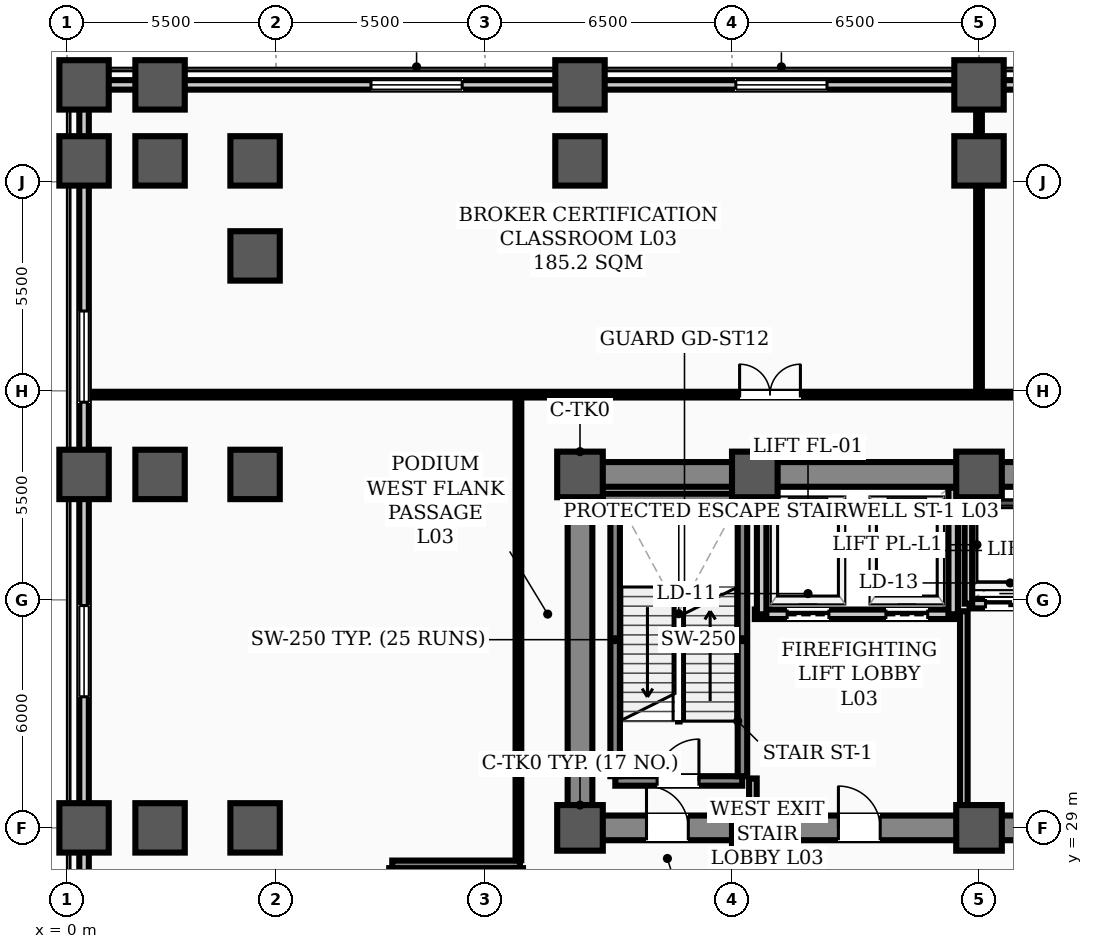
"""IFC4 building model, lengths in metres.
Left out: names, types, materials, properties, quantities, classifications, styles, units other than length and angle.
Written with IfcOpenShell. Run it as: python <this file> out.ifc"""

import sys

from ifc_helpers import new_model, si_unit, direction, frame, frame_2d, origin, origin_2d, place, context, subcontext, project, spatial, rectangle, hollow_rectangle, extrude, element, fill, save


model = new_model("IFC4")
c1 = context("Model", 3, precision=1e-05, world=origin(), true_north=direction((0.0, 1.0)))
c2 = subcontext(c1, "Body", "Model", "MODEL_VIEW")
j1 = project(units=[si_unit("LENGTHUNIT", "METRE"), si_unit("PLANEANGLEUNIT", "RADIAN")], contexts=[c1])
p1 = place(None, origin())
s1 = spatial("IfcSite", under=j1, at=p1, CompositionType="ELEMENT")
p2 = place(p1, origin())
s2 = spatial("IfcBuilding", under=s1, at=p2, CompositionType="ELEMENT")
p3 = place(p2, frame((0.0, 0.0, 11.2)))
s3 = spatial("IfcBuildingStorey", under=s2, at=p3, CompositionType="ELEMENT", Elevation=11.2)
for number, where, z_axis, x_axis in (
    (1, (13.5, 29.0, 0.0), (0.0, 0.0, 1.0), (1.0, 0.0, 0.0)),
    (2, (13.5, 38.3, 0.0), (0.0, 0.0, 1.0), (1.0, 0.0, 0.0)),
    (3, (18.1, 29.0, 0.0), (0.0, 0.0, 1.0), (1.0, 0.0, 0.0)),
    (4, (18.1, 38.3, 0.0), (0.0, 0.0, 1.0), (1.0, 0.0, 0.0)),
    (5, (24.0, 29.0, 0.0), (0.0, 0.0, 1.0), (1.0, 0.0, 0.0)),
    (6, (24.0, 38.3, 0.0), (0.0, 0.0, 1.0), (1.0, 0.0, 0.0)),
):
    element("IfcColumn", number, at=place(p3, frame(where, z_axis=z_axis, x_axis=x_axis)), inside=s3, PredefinedType="COLUMN", context=c2, shape_type="SweptSolid", body=[
        extrude(hollow_rectangle(XDim=1.2, YDim=1.2, WallThickness=0.04, InnerFilletRadius=0.02, OuterFilletRadius=0.06, at=origin_2d()), origin(), (0.0, 0.0, 1.0), 5.4),
    ])
for number, where, z_axis, x_axis in (
    (7, (0.45, 29.0, 0.0), (0.0, 0.0, 1.0), (1.0, 0.0, 0.0)),
    (8, (0.45, 38.3, 0.0), (0.0, 0.0, 1.0), (1.0, 0.0, 0.0)),
    (9, (0.45, 46.55, 0.0), (0.0, 0.0, 1.0), (1.0, 0.0, 0.0)),
    (10, (0.45, 48.55, 0.0), (0.0, 0.0, 1.0), (1.0, 0.0, 0.0)),
    (11, (2.45, 29.0, 0.0), (0.0, 0.0, 1.0), (1.0, 0.0, 0.0)),
    (12, (2.45, 38.3, 0.0), (0.0, 0.0, 1.0), (1.0, 0.0, 0.0)),
    (13, (2.45, 46.55, 0.0), (0.0, 0.0, 1.0), (1.0, 0.0, 0.0)),
    (14, (2.45, 48.55, 0.0), (0.0, 0.0, 1.0), (1.0, 0.0, 0.0)),
    (15, (4.95, 29.0, 0.0), (0.0, 0.0, 1.0), (1.0, 0.0, 0.0)),
    (16, (4.95, 38.3, 0.0), (0.0, 0.0, 1.0), (1.0, 0.0, 0.0)),
    (17, (4.95, 44.05, 0.0), (0.0, 0.0, 1.0), (1.0, 0.0, 0.0)),
    (18, (4.95, 46.55, 0.0), (0.0, 0.0, 1.0), (1.0, 0.0, 0.0)),
    (19, (13.5, 46.55, 0.0), (0.0, 0.0, 1.0), (1.0, 0.0, 0.0)),
    (20, (13.5, 48.55, 0.0), (0.0, 0.0, 1.0), (1.0, 0.0, 0.0)),
    (21, (24.0, 46.55, 0.0), (0.0, 0.0, 1.0), (1.0, 0.0, 0.0)),
    (22, (24.0, 48.55, 0.0), (0.0, 0.0, 1.0), (1.0, 0.0, 0.0)),
):
    element("IfcColumn", number, at=place(p3, frame(where, z_axis=z_axis, x_axis=x_axis)), inside=s3, PredefinedType="COLUMN", context=c2, shape_type="SweptSolid", body=[
        extrude(rectangle(XDim=1.3, YDim=1.3, at=origin_2d()), origin(), (0.0, 0.0, 1.0), 5.4),
    ])
p4 = place(p3, frame((0.45, 48.55, 0.0), z_axis=(0.0, 0.0, 1.0), x_axis=(1.0, 0.0, 0.0)))
e23 = element("IfcWall", 23, at=p4, inside=s3, PredefinedType="STANDARD", context=c2, shape_type="SweptSolid", body=[
    extrude(rectangle(XDim=54.1, YDim=0.25, at=frame_2d((27.05, 0.0))), origin(), (0.0, 0.0, 1.0), 4.37),
])
p5 = place(p4, frame((7.55, 0.0, 0.9)))
e24 = element("IfcOpeningElement", 24, at=p5, cuts=e23, PredefinedType="OPENING", context=c2, shape_type="SweptSolid", body=[
    extrude(rectangle(XDim=2.4, YDim=2.1, at=frame_2d((1.2, 1.05))), frame((0.0, 0.135, 0.0), z_axis=(0.0, -1.0, 0.0), x_axis=(1.0, 0.0, 0.0)), (0.0, 0.0, 1.0), 0.27),
])
p6 = place(p4, frame((17.15, 0.0, 0.9)))
e25 = element("IfcOpeningElement", 25, at=p6, cuts=e23, PredefinedType="OPENING", context=c2, shape_type="SweptSolid", body=[
    extrude(rectangle(XDim=2.4, YDim=2.1, at=frame_2d((1.2, 1.05))), frame((0.0, 0.135, 0.0), z_axis=(0.0, -1.0, 0.0), x_axis=(1.0, 0.0, 0.0)), (0.0, 0.0, 1.0), 0.27),
])
p7 = place(p4, frame((32.6, 0.0, 0.9)))
e26 = element("IfcOpeningElement", 26, at=p7, cuts=e23, PredefinedType="OPENING", context=c2, shape_type="SweptSolid", body=[
    extrude(rectangle(XDim=2.4, YDim=2.1, at=frame_2d((1.2, 1.05))), frame((0.0, 0.135, 0.0), z_axis=(0.0, -1.0, 0.0), x_axis=(1.0, 0.0, 0.0)), (0.0, 0.0, 1.0), 0.27),
])
p8 = place(p4, frame((39.1, 0.0, 0.9)))
e27 = element("IfcOpeningElement", 27, at=p8, cuts=e23, PredefinedType="OPENING", context=c2, shape_type="SweptSolid", body=[
    extrude(rectangle(XDim=2.4, YDim=2.1, at=frame_2d((1.2, 1.05))), frame((0.0, 0.135, 0.0), z_axis=(0.0, -1.0, 0.0), x_axis=(1.0, 0.0, 0.0)), (0.0, 0.0, 1.0), 0.27),
])
p9 = place(p3, frame((0.45, 3.45, 0.0), z_axis=(0.0, 0.0, 1.0), x_axis=(0.0, 1.0, 0.0)))
e28 = element("IfcWall", 28, at=p9, inside=s3, PredefinedType="STANDARD", context=c2, shape_type="SweptSolid", body=[
    extrude(rectangle(XDim=45.1, YDim=0.25, at=frame_2d((22.55, 0.0))), origin(), (0.0, 0.0, 1.0), 4.37),
])
p10 = place(p9, frame((4.8, 0.0, 0.9)))
e29 = element("IfcOpeningElement", 29, at=p10, cuts=e28, PredefinedType="OPENING", context=c2, shape_type="SweptSolid", body=[
    extrude(rectangle(XDim=2.4, YDim=2.1, at=frame_2d((1.2, 1.05))), frame((0.0, 0.135, 0.0), z_axis=(0.0, -1.0, 0.0), x_axis=(1.0, 0.0, 0.0)), (0.0, 0.0, 1.0), 0.27),
])
p11 = place(p9, frame((19.85, 0.0, 0.9)))
e30 = element("IfcOpeningElement", 30, at=p11, cuts=e28, PredefinedType="OPENING", context=c2, shape_type="SweptSolid", body=[
    extrude(rectangle(XDim=2.4, YDim=2.1, at=frame_2d((1.2, 1.05))), frame((0.0, 0.135, 0.0), z_axis=(0.0, -1.0, 0.0), x_axis=(1.0, 0.0, 0.0)), (0.0, 0.0, 1.0), 0.27),
])
p12 = place(p9, frame((29.0, 0.0, 0.9)))
e31 = element("IfcOpeningElement", 31, at=p12, cuts=e28, PredefinedType="OPENING", context=c2, shape_type="SweptSolid", body=[
    extrude(rectangle(XDim=2.4, YDim=2.1, at=frame_2d((1.2, 1.05))), frame((0.0, 0.135, 0.0), z_axis=(0.0, -1.0, 0.0), x_axis=(1.0, 0.0, 0.0)), (0.0, 0.0, 1.0), 0.27),
])
p13 = place(p9, frame((36.75, 0.0, 0.9)))
e32 = element("IfcOpeningElement", 32, at=p13, cuts=e28, PredefinedType="OPENING", context=c2, shape_type="SweptSolid", body=[
    extrude(rectangle(XDim=2.4, YDim=2.1, at=frame_2d((1.2, 1.05))), frame((0.0, 0.135, 0.0), z_axis=(0.0, -1.0, 0.0), x_axis=(1.0, 0.0, 0.0)), (0.0, 0.0, 1.0), 0.27),
])
p14 = place(p3, frame((13.5, 29.0, 0.0), z_axis=(0.0, 0.0, 1.0), x_axis=(1.0, 0.0, 0.0)))
e33 = element("IfcWall", 33, at=p14, inside=s3, PredefinedType="SHEAR", context=c2, shape_type="SweptSolid", body=[
    extrude(rectangle(XDim=30.5, YDim=0.65, at=frame_2d((15.25, 0.0))), origin(), (0.0, 0.0, 1.0), 5.15),
])
p15 = place(p14, frame((1.75, 0.0, 0.0)))
e34 = element("IfcOpeningElement", 34, at=p15, cuts=e33, PredefinedType="OPENING", context=c2, shape_type="SweptSolid", body=[
    extrude(rectangle(XDim=1.1, YDim=2.08, at=frame_2d((0.55, 1.04))), frame((0.0, 0.335, 0.0), z_axis=(0.0, -1.0, 0.0), x_axis=(1.0, 0.0, 0.0)), (0.0, 0.0, 1.0), 0.67),
])
p16 = place(p14, frame((26.7, 0.0, 0.0)))
e35 = element("IfcOpeningElement", 35, at=p16, cuts=e33, PredefinedType="OPENING", context=c2, shape_type="SweptSolid", body=[
    extrude(rectangle(XDim=1.1, YDim=2.08, at=frame_2d((0.55, 1.04))), frame((0.0, 0.335, 0.0), z_axis=(0.0, -1.0, 0.0), x_axis=(1.0, 0.0, 0.0)), (0.0, 0.0, 1.0), 0.67),
])
p17 = place(p14, frame((6.8, 0.0, 0.0)))
e36 = element("IfcOpeningElement", 36, at=p17, cuts=e33, PredefinedType="OPENING", context=c2, shape_type="SweptSolid", body=[
    extrude(rectangle(XDim=1.1, YDim=2.08, at=frame_2d((0.55, 1.04))), frame((0.0, 0.335, 0.0), z_axis=(0.0, -1.0, 0.0), x_axis=(1.0, 0.0, 0.0)), (0.0, 0.0, 1.0), 0.67),
])
p18 = place(p14, frame((13.2, 0.0, 0.0)))
e37 = element("IfcOpeningElement", 37, at=p18, cuts=e33, PredefinedType="OPENING", context=c2, shape_type="SweptSolid", body=[
    extrude(rectangle(XDim=1.6, YDim=2.08, at=frame_2d((0.8, 1.04))), frame((0.0, 0.335, 0.0), z_axis=(0.0, -1.0, 0.0), x_axis=(1.0, 0.0, 0.0)), (0.0, 0.0, 1.0), 0.67),
])
p19 = place(p14, frame((19.6, 0.0, 0.0)))
e38 = element("IfcOpeningElement", 38, at=p19, cuts=e33, PredefinedType="OPENING", context=c2, shape_type="SweptSolid", body=[
    extrude(rectangle(XDim=0.9, YDim=2.08, at=frame_2d((0.45, 1.04))), frame((0.0, 0.335, 0.0), z_axis=(0.0, -1.0, 0.0), x_axis=(1.0, 0.0, 0.0)), (0.0, 0.0, 1.0), 0.67),
])
p20 = place(p14, frame((21.6, 0.0, 0.0)))
e39 = element("IfcOpeningElement", 39, at=p20, cuts=e33, PredefinedType="OPENING", context=c2, shape_type="SweptSolid", body=[
    extrude(rectangle(XDim=0.9, YDim=2.08, at=frame_2d((0.45, 1.04))), frame((0.0, 0.335, 0.0), z_axis=(0.0, -1.0, 0.0), x_axis=(1.0, 0.0, 0.0)), (0.0, 0.0, 1.0), 0.67),
])
p21 = place(p3, frame((13.5, 38.3, 0.0), z_axis=(0.0, 0.0, 1.0), x_axis=(1.0, 0.0, 0.0)))
e40 = element("IfcWall", 40, at=p21, inside=s3, PredefinedType="SHEAR", context=c2, shape_type="SweptSolid", body=[
    extrude(rectangle(XDim=30.5, YDim=0.65, at=frame_2d((15.25, 0.0))), origin(), (0.0, 0.0, 1.0), 5.15),
])
p22 = place(p3, frame((13.5, 29.35, 0.0), z_axis=(0.0, 0.0, 1.0), x_axis=(0.0, 1.0, 0.0)))
e41 = element("IfcWall", 41, at=p22, inside=s3, PredefinedType="SHEAR", context=c2, shape_type="SweptSolid", body=[
    extrude(rectangle(XDim=8.6, YDim=0.65, at=frame_2d((4.3, 0.0))), origin(), (0.0, 0.0, 1.0), 5.15),
])
p23 = place(p3, frame((14.43, 30.235, 0.0), z_axis=(0.0, 0.0, 1.0), x_axis=(1.0, 0.0, 0.0)))
e42 = element("IfcWall", 42, at=p23, inside=s3, PredefinedType="STANDARD", context=c2, shape_type="SweptSolid", body=[
    extrude(rectangle(XDim=3.34, YDim=0.25, at=frame_2d((1.67, 0.0))), origin(), (0.0, 0.0, 1.0), 5.15),
])
p24 = place(p23, frame((1.1, 0.0, 0.0)))
e43 = element("IfcOpeningElement", 43, at=p24, cuts=e42, PredefinedType="OPENING", context=c2, shape_type="SweptSolid", body=[
    extrude(rectangle(XDim=1.1, YDim=2.08, at=frame_2d((0.55, 1.04))), frame((0.0, 0.135, 0.0), z_axis=(0.0, -1.0, 0.0), x_axis=(1.0, 0.0, 0.0)), (0.0, 0.0, 1.0), 0.27),
])
p25 = place(p3, frame((14.1, 37.669, 0.0), z_axis=(0.0, 0.0, 1.0), x_axis=(1.0, 0.0, 0.0)))
e44 = element("IfcWall", 44, at=p25, inside=s3, PredefinedType="STANDARD", context=c2, shape_type="SweptSolid", body=[
    extrude(rectangle(XDim=3.67, YDim=0.25, at=frame_2d((1.835, 0.0))), origin(), (0.0, 0.0, 1.0), 5.15),
])
for number, where, z_axis, x_axis in (
    (45, (14.425, 30.36, 0.0), (0.0, 0.0, 1.0), (0.0, 1.0, 0.0)),
    (46, (17.775, 30.36, 0.0), (0.0, 0.0, 1.0), (0.0, 1.0, 0.0)),
):
    element("IfcWall", number, at=place(p3, frame(where, z_axis=z_axis, x_axis=x_axis)), inside=s3, PredefinedType="STANDARD", context=c2, shape_type="SweptSolid", body=[
        extrude(rectangle(XDim=7.184, YDim=0.25, at=frame_2d((3.592, 0.0))), origin(), (0.0, 0.0, 1.0), 5.15),
    ])
p26 = place(p3, frame((18.1, 34.62, 0.0), z_axis=(0.0, 0.0, 1.0), x_axis=(1.0, 0.0, 0.0)))
e47 = element("IfcWall", 47, at=p26, inside=s3, PredefinedType="STANDARD", context=c2, shape_type="SweptSolid", body=[
    extrude(rectangle(XDim=5.35, YDim=0.25, at=frame_2d((2.675, 0.0))), origin(), (0.0, 0.0, 1.0), 5.15),
])
p27 = place(p26, frame((0.85, 0.0, 0.0)))
e48 = element("IfcOpeningElement", 48, at=p27, cuts=e47, PredefinedType="OPENING", context=c2, shape_type="SweptSolid", body=[
    extrude(rectangle(XDim=1.1, YDim=2.08, at=frame_2d((0.55, 1.04))), frame((0.0, 0.135, 0.0), z_axis=(0.0, -1.0, 0.0), x_axis=(1.0, 0.0, 0.0)), (0.0, 0.0, 1.0), 0.27),
])
p28 = place(p26, frame((3.45, 0.0, 0.0)))
e49 = element("IfcOpeningElement", 49, at=p28, cuts=e47, PredefinedType="OPENING", context=c2, shape_type="SweptSolid", body=[
    extrude(rectangle(XDim=1.1, YDim=2.08, at=frame_2d((0.55, 1.04))), frame((0.0, 0.135, 0.0), z_axis=(0.0, -1.0, 0.0), x_axis=(1.0, 0.0, 0.0)), (0.0, 0.0, 1.0), 0.27),
])
for number, where, z_axis, x_axis in (
    (50, (18.28, 34.62, 0.0), (0.0, 0.0, 1.0), (0.0, 1.0, 0.0)),
    (51, (23.32, 34.62, 0.0), (0.0, 0.0, 1.0), (0.0, 1.0, 0.0)),
):
    element("IfcWall", number, at=place(p3, frame(where, z_axis=z_axis, x_axis=x_axis)), inside=s3, PredefinedType="STANDARD", context=c2, shape_type="SweptSolid", body=[
        extrude(rectangle(XDim=3.33, YDim=0.25, at=frame_2d((1.665, 0.0))), origin(), (0.0, 0.0, 1.0), 4.33),
    ])
p29 = place(p3, frame((23.75, 34.9, 0.0), z_axis=(0.0, 0.0, 1.0), x_axis=(1.0, 0.0, 0.0)))
e52 = element("IfcWall", 52, at=p29, inside=s3, PredefinedType="STANDARD", context=c2, shape_type="SweptSolid", body=[
    extrude(rectangle(XDim=4.4, YDim=0.25, at=frame_2d((2.2, 0.0))), origin(), (0.0, 0.0, 1.0), 5.15),
])
p30 = place(p29, frame((0.42, 0.0, 0.0)))
e53 = element("IfcOpeningElement", 53, at=p30, cuts=e52, PredefinedType="OPENING", context=c2, shape_type="SweptSolid", body=[
    extrude(rectangle(XDim=1.3, YDim=2.08, at=frame_2d((0.65, 1.04))), frame((0.0, 0.135, 0.0), z_axis=(0.0, -1.0, 0.0), x_axis=(1.0, 0.0, 0.0)), (0.0, 0.0, 1.0), 0.27),
])
p31 = place(p29, frame((2.68, 0.0, 0.0)))
e54 = element("IfcOpeningElement", 54, at=p31, cuts=e52, PredefinedType="OPENING", context=c2, shape_type="SweptSolid", body=[
    extrude(rectangle(XDim=1.3, YDim=2.08, at=frame_2d((0.65, 1.04))), frame((0.0, 0.135, 0.0), z_axis=(0.0, -1.0, 0.0), x_axis=(1.0, 0.0, 0.0)), (0.0, 0.0, 1.0), 0.27),
])
p32 = place(p3, frame((8.56, 28.04, 0.0), z_axis=(0.0, 0.0, 1.0), x_axis=(1.0, 0.0, 0.0)))
e55 = element("IfcWall", 55, at=p32, inside=s3, PredefinedType="STANDARD", context=c2, shape_type="SweptSolid", body=[
    extrude(rectangle(XDim=3.36, YDim=0.2, at=frame_2d((1.68, 0.0))), origin(), (0.0, 0.0, 1.0), 5.15),
])
for number, where, z_axis, x_axis in (
    (56, (8.58, 21.1, 0.0), (0.0, 0.0, 1.0), (0.0, 1.0, 0.0)),
    (57, (11.9, 21.1, 0.0), (0.0, 0.0, 1.0), (0.0, 1.0, 0.0)),
):
    element("IfcWall", number, at=place(p3, frame(where, z_axis=z_axis, x_axis=x_axis)), inside=s3, PredefinedType="STANDARD", context=c2, shape_type="SweptSolid", body=[
        extrude(rectangle(XDim=6.84, YDim=0.2, at=frame_2d((3.42, 0.0))), origin(), (0.0, 0.0, 1.0), 5.15),
    ])
p33 = place(p3, frame((0.58, 40.4, 0.0), z_axis=(0.0, 0.0, 1.0), x_axis=(1.0, 0.0, 0.0)))
e58 = element("IfcWall", 58, at=p33, inside=s3, PredefinedType="PARTITIONING", context=c2, shape_type="SweptSolid", body=[
    extrude(rectangle(XDim=53.89, YDim=0.15, at=frame_2d((26.945, 0.0))), origin(), (0.0, 0.0, 1.0), 4.43),
])
p34 = place(p33, frame((17.12, 0.0, 0.0)))
e59 = element("IfcOpeningElement", 59, at=p34, cuts=e58, PredefinedType="OPENING", context=c2, shape_type="SweptSolid", body=[
    extrude(rectangle(XDim=1.6, YDim=2.08, at=frame_2d((0.8, 1.04))), frame((0.0, 0.085, 0.0), z_axis=(0.0, -1.0, 0.0), x_axis=(1.0, 0.0, 0.0)), (0.0, 0.0, 1.0), 0.17),
])
p35 = place(p33, frame((32.87, 0.0, 0.0)))
e60 = element("IfcOpeningElement", 60, at=p35, cuts=e58, PredefinedType="OPENING", context=c2, shape_type="SweptSolid", body=[
    extrude(rectangle(XDim=1.6, YDim=2.08, at=frame_2d((0.8, 1.04))), frame((0.0, 0.085, 0.0), z_axis=(0.0, -1.0, 0.0), x_axis=(1.0, 0.0, 0.0)), (0.0, 0.0, 1.0), 0.17),
])
p36 = place(p3, frame((11.88, 28.15, 0.0), z_axis=(0.0, 0.0, 1.0), x_axis=(0.0, 1.0, 0.0)))
e61 = element("IfcWall", 61, at=p36, inside=s3, PredefinedType="PARTITIONING", context=c2, shape_type="SweptSolid", body=[
    extrude(rectangle(XDim=12.165, YDim=0.15, at=frame_2d((6.083, 0.0))), origin(), (0.0, 0.0, 1.0), 4.33),
])
p37 = place(p3, frame((24.0, 40.485, 0.0), z_axis=(0.0, 0.0, 1.0), x_axis=(0.0, 1.0, 0.0)))
e62 = element("IfcWall", 62, at=p37, inside=s3, PredefinedType="PARTITIONING", context=c2, shape_type="SweptSolid", body=[
    extrude(rectangle(XDim=7.935, YDim=0.15, at=frame_2d((3.967, 0.0))), origin(), (0.0, 0.0, 1.0), 4.33),
])
p38 = place(p3, frame((18.05, 29.335, 0.0), z_axis=(0.0, 0.0, 1.0), x_axis=(0.0, 1.0, 0.0)))
e63 = element("IfcWall", 63, at=p38, inside=s3, PredefinedType="STANDARD", context=c2, shape_type="SweptSolid", body=[
    extrude(rectangle(XDim=0.965, YDim=0.2, at=frame_2d((0.482, 0.0))), origin(), (0.0, 0.0, 1.0), 4.33),
])
p39 = place(p3, frame((23.6, 29.335, 0.0), z_axis=(0.0, 0.0, 1.0), x_axis=(0.0, 1.0, 0.0)))
e64 = element("IfcWall", 64, at=p39, inside=s3, PredefinedType="STANDARD", context=c2, shape_type="SweptSolid", body=[
    extrude(rectangle(XDim=5.365, YDim=0.2, at=frame_2d((2.683, 0.0))), origin(), (0.0, 0.0, 1.0), 4.33),
])
p40 = place(p3, frame((23.72, 34.9, 0.0), z_axis=(0.0, 0.0, 1.0), x_axis=(0.0, 1.0, 0.0)))
e65 = element("IfcWall", 65, at=p40, inside=s3, PredefinedType="STANDARD", context=c2, shape_type="SweptSolid", body=[
    extrude(rectangle(XDim=3.12, YDim=0.2, at=frame_2d((1.56, 0.0))), origin(), (0.0, 0.0, 1.0), 4.33),
])
p41 = place(p5, origin())
e66 = element("IfcWindow", 66, at=p41, inside=s3, PartitioningType="SINGLE_PANEL", PredefinedType="WINDOW", context=c2, shape_type="SweptSolid", body=[
    extrude(rectangle(XDim=2.4, YDim=2.1, at=frame_2d((1.2, 1.05))), frame((0.0, 0.03, 0.0), z_axis=(0.0, -1.0, 0.0), x_axis=(1.0, 0.0, 0.0)), (0.0, 0.0, 1.0), 0.06),
])
fill(e24, e66)
p42 = place(p6, origin())
e67 = element("IfcWindow", 67, at=p42, inside=s3, PartitioningType="SINGLE_PANEL", PredefinedType="WINDOW", context=c2, shape_type="SweptSolid", body=[
    extrude(rectangle(XDim=2.4, YDim=2.1, at=frame_2d((1.2, 1.05))), frame((0.0, 0.03, 0.0), z_axis=(0.0, -1.0, 0.0), x_axis=(1.0, 0.0, 0.0)), (0.0, 0.0, 1.0), 0.06),
])
fill(e25, e67)
p43 = place(p12, origin())
e68 = element("IfcWindow", 68, at=p43, inside=s3, PartitioningType="SINGLE_PANEL", PredefinedType="WINDOW", context=c2, shape_type="SweptSolid", body=[
    extrude(rectangle(XDim=2.4, YDim=2.1, at=frame_2d((1.2, 1.05))), frame((0.0, 0.03, 0.0), z_axis=(0.0, -1.0, 0.0), x_axis=(1.0, 0.0, 0.0)), (0.0, 0.0, 1.0), 0.06),
])
fill(e31, e68)
p44 = place(p13, origin())
e69 = element("IfcWindow", 69, at=p44, inside=s3, PartitioningType="SINGLE_PANEL", PredefinedType="WINDOW", context=c2, shape_type="SweptSolid", body=[
    extrude(rectangle(XDim=2.4, YDim=2.1, at=frame_2d((1.2, 1.05))), frame((0.0, 0.03, 0.0), z_axis=(0.0, -1.0, 0.0), x_axis=(1.0, 0.0, 0.0)), (0.0, 0.0, 1.0), 0.06),
])
fill(e32, e69)
p45 = place(p24, origin())
e70 = element("IfcDoor", 70, at=p45, inside=s3, OperationType="SINGLE_SWING_RIGHT", PredefinedType="DOOR", context=c2, shape_type="SweptSolid", body=[
    extrude(rectangle(XDim=1.1, YDim=2.08, at=frame_2d((0.55, 1.04))), frame((0.0, 0.025, 0.0), z_axis=(0.0, -1.0, 0.0), x_axis=(1.0, 0.0, 0.0)), (0.0, 0.0, 1.0), 0.05),
])
fill(e43, e70)
p46 = place(p34, origin())
e71 = element("IfcDoor", 71, at=p46, inside=s3, OperationType="DOUBLE_DOOR_SINGLE_SWING", PredefinedType="DOOR", context=c2, shape_type="SweptSolid", body=[
    extrude(rectangle(XDim=1.6, YDim=2.08, at=frame_2d((0.8, 1.04))), frame((0.0, 0.025, 0.0), z_axis=(0.0, -1.0, 0.0), x_axis=(1.0, 0.0, 0.0)), (0.0, 0.0, 1.0), 0.05),
])
fill(e59, e71)
p47 = place(p15, origin())
e72 = element("IfcDoor", 72, at=p47, inside=s3, OperationType="SINGLE_SWING_LEFT", PredefinedType="DOOR", context=c2, shape_type="SweptSolid", body=[
    extrude(rectangle(XDim=1.1, YDim=2.08, at=frame_2d((0.55, 1.04))), frame((0.0, 0.025, 0.0), z_axis=(0.0, -1.0, 0.0), x_axis=(1.0, 0.0, 0.0)), (0.0, 0.0, 1.0), 0.05),
])
fill(e34, e72)
p48 = place(p17, origin())
e73 = element("IfcDoor", 73, at=p48, inside=s3, OperationType="SINGLE_SWING_LEFT", PredefinedType="DOOR", context=c2, shape_type="SweptSolid", body=[
    extrude(rectangle(XDim=1.1, YDim=2.08, at=frame_2d((0.55, 1.04))), frame((0.0, 0.025, 0.0), z_axis=(0.0, -1.0, 0.0), x_axis=(1.0, 0.0, 0.0)), (0.0, 0.0, 1.0), 0.05),
])
fill(e36, e73)
p49 = place(p27, origin())
e74 = element("IfcDoor", 74, at=p49, inside=s3, OperationType="SLIDING_TO_LEFT", PredefinedType="DOOR", context=c2, shape_type="SweptSolid", body=[
    extrude(rectangle(XDim=1.1, YDim=2.08, at=frame_2d((0.55, 1.04))), frame((0.0, 0.025, 0.0), z_axis=(0.0, -1.0, 0.0), x_axis=(1.0, 0.0, 0.0)), (0.0, 0.0, 1.0), 0.05),
])
fill(e48, e74)
p50 = place(p28, origin())
e75 = element("IfcDoor", 75, at=p50, inside=s3, OperationType="SLIDING_TO_LEFT", PredefinedType="DOOR", context=c2, shape_type="SweptSolid", body=[
    extrude(rectangle(XDim=1.1, YDim=2.08, at=frame_2d((0.55, 1.04))), frame((0.0, 0.025, 0.0), z_axis=(0.0, -1.0, 0.0), x_axis=(1.0, 0.0, 0.0)), (0.0, 0.0, 1.0), 0.05),
])
fill(e49, e75)
p51 = place(p30, origin())
e76 = element("IfcDoor", 76, at=p51, inside=s3, OperationType="DOUBLE_DOOR_SLIDING", PredefinedType="DOOR", context=c2, shape_type="SweptSolid", body=[
    extrude(rectangle(XDim=1.3, YDim=2.08, at=frame_2d((0.65, 1.04))), frame((0.0, 0.025, 0.0), z_axis=(0.0, -1.0, 0.0), x_axis=(1.0, 0.0, 0.0)), (0.0, 0.0, 1.0), 0.05),
])
fill(e53, e76)
save(model, sys.argv[1])
